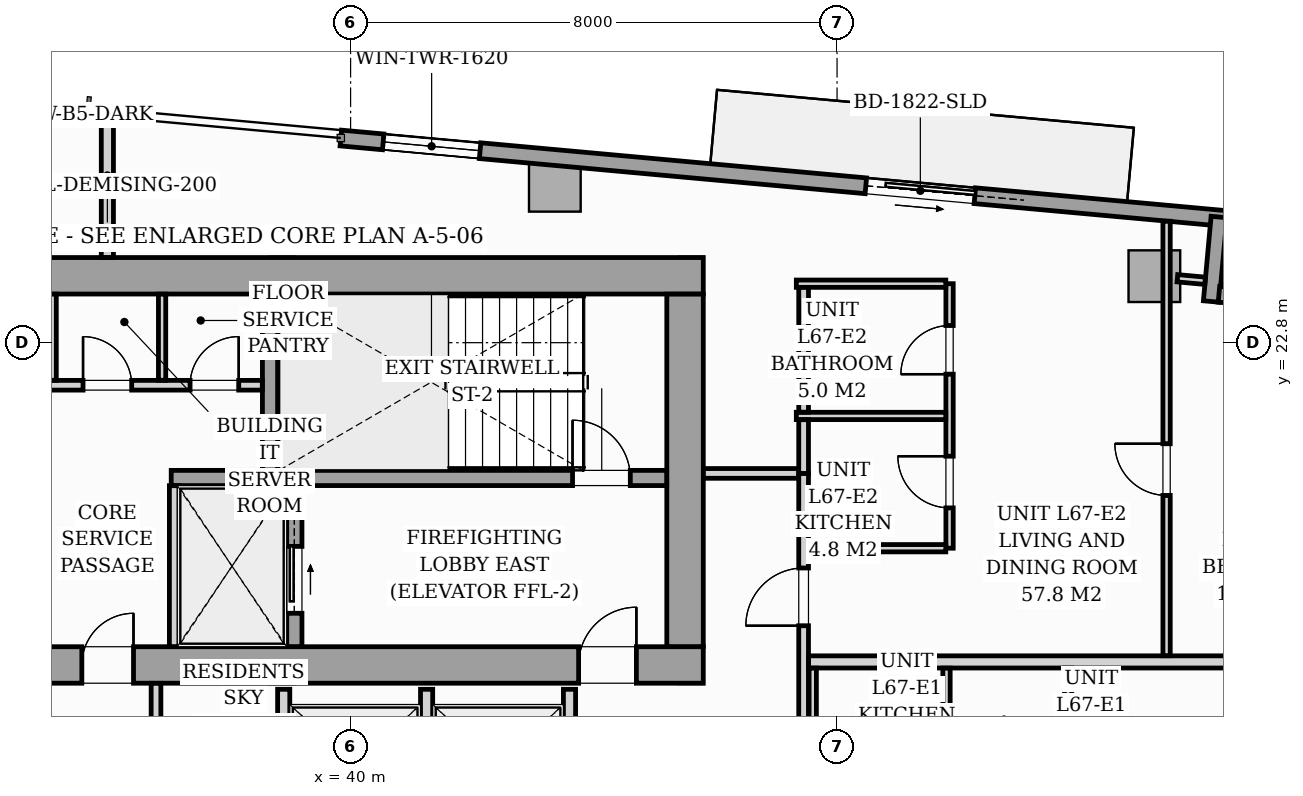
"""IFC4 building model, lengths in metres.
Left out: names, types, materials, properties, quantities, classifications, styles, units other than length and angle.
Written with IfcOpenShell. Run it as: python <this file> out.ifc"""

import sys

from ifc_helpers import new_model, si_unit, direction, frame, frame_2d, origin, origin_2d, place, context, subcontext, project, spatial, rectangle, i_section, extrude, source, transform, mapped, element, fill, save


model = new_model("IFC4")
c1 = context("Model", 3, precision=1e-05, world=origin(), true_north=direction((0.0, 1.0)))
c2 = subcontext(c1, "Body", "Model", "MODEL_VIEW")
j1 = project(units=[si_unit("LENGTHUNIT", "METRE"), si_unit("PLANEANGLEUNIT", "RADIAN")], contexts=[c1])
p1 = place(None, origin())
s1 = spatial("IfcSite", under=j1, at=p1, CompositionType="ELEMENT")
p2 = place(p1, origin())
s2 = spatial("IfcBuilding", under=s1, at=p2, CompositionType="ELEMENT")
p3 = place(p2, frame((0.0, 0.0, 233.1)))
s3 = spatial("IfcBuildingStorey", under=s2, at=p3, CompositionType="ELEMENT", Elevation=233.1)
m1 = source(origin(), c2, "Body", "SweptSolid", [
    extrude(i_section(OverallWidth=0.409, OverallDepth=0.425, WebThickness=0.033, FlangeThickness=0.052, FilletRadius=0.018, at=origin_2d()), origin(), (0.0, 0.0, 1.0), 3.296),
])
for number, where, z_axis, x_axis in (
    (1, (38.88, 17.4, 0.002), (0.0, 0.0, 1.0), (1.0, 0.0, 0.0)),
    (2, (45.6, 17.4, 0.002), (0.0, 0.0, 1.0), (1.0, 0.0, 0.0)),
    (3, (38.88, 24.0, 0.002), (0.0, 0.0, 1.0), (1.0, 0.0, 0.0)),
    (4, (45.6, 24.0, 0.002), (0.0, 0.0, 1.0), (1.0, 0.0, 0.0)),
):
    element("IfcColumn", number, at=place(p3, frame(where, z_axis=z_axis, x_axis=x_axis)), inside=s3, PredefinedType="PILASTER", context=c2, shape_type="MappedRepresentation", body=[
        mapped(m1, transform((0.0, 0.0, 0.0), scale=1.0)),
    ])
m2 = source(origin(), c2, "Body", "SweptSolid", [
    extrude(rectangle(XDim=0.85, YDim=0.85, at=origin_2d()), origin(), (0.0, 0.0, 1.0), 3.296),
])
for number, where, z_axis, x_axis in (
    (5, (43.359, 25.38, 0.002), (0.0, 0.0, 1.0), (0.996, -0.091, 0.0)),
    (6, (53.218, 23.894, 0.002), (0.0, 0.0, 1.0), (0.996, -0.091, 0.0)),
):
    element("IfcColumn", number, at=place(p3, frame(where, z_axis=z_axis, x_axis=x_axis)), inside=s3, PredefinedType="COLUMN", context=c2, shape_type="MappedRepresentation", body=[
        mapped(m2, transform((0.0, 0.0, 0.0), scale=1.0)),
    ])
p4 = place(p3, frame((39.839, 26.166, 0.0), z_axis=(0.0, 0.0, 1.0), x_axis=(0.995884447498, -0.090632043071, 0.0)))
e7 = element("IfcWall", 7, at=p4, inside=s3, PredefinedType="STANDARD", context=c2, shape_type="SweptSolid", body=[
    extrude(rectangle(XDim=14.63, YDim=0.26, at=frame_2d((7.315, 0.0))), origin(), (0.0, 0.0, 1.0), 3.04),
])
p5 = place(p4, frame((8.67, 0.0, 0.0)))
e8 = element("IfcOpeningElement", 8, at=p5, cuts=e7, PredefinedType="OPENING", context=c2, shape_type="SweptSolid", body=[
    extrude(rectangle(XDim=1.8, YDim=2.06, at=frame_2d((0.9, 1.03))), frame((0.0, 0.14, 0.0), z_axis=(0.0, -1.0, 0.0), x_axis=(1.0, 0.0, 0.0)), (0.0, 0.0, 1.0), 0.28),
])
p6 = place(p4, frame((0.7, 0.0, 0.65)))
e9 = element("IfcOpeningElement", 9, at=p6, cuts=e7, PredefinedType="OPENING", context=c2, shape_type="SweptSolid", body=[
    extrude(rectangle(XDim=1.6, YDim=1.5, at=frame_2d((0.8, 0.75))), frame((0.0, 0.14, 0.0), z_axis=(0.0, -1.0, 0.0), x_axis=(1.0, 0.0, 0.0)), (0.0, 0.0, 1.0), 0.28),
])
p7 = place(p3, frame((54.281, 24.866, 0.0), z_axis=(0.0, 0.0, 1.0), x_axis=(-0.090661991521, -0.995881721538, 0.0)))
e10 = element("IfcWall", 10, at=p7, inside=s3, PredefinedType="STANDARD", context=c2, shape_type="SweptSolid", body=[
    extrude(rectangle(XDim=1.395, YDim=0.26, at=frame_2d((0.698, 0.0))), origin(), (0.0, 0.0, 1.0), 3.04),
])
p8 = place(p3, frame((54.281, 23.596, 0.0), z_axis=(0.0, 0.0, 1.0), x_axis=(0.995883159782, -0.090646191665, 0.0)))
e11 = element("IfcWall", 11, at=p8, inside=s3, PredefinedType="STANDARD", context=c2, shape_type="SweptSolid", body=[
    extrude(rectangle(XDim=1.395, YDim=0.26, at=frame_2d((0.698, 0.0))), origin(), (0.0, 0.0, 1.0), 3.04),
])
p9 = place(p3, frame((26.2, 17.5, 0.0), z_axis=(0.0, 0.0, 1.0), x_axis=(1.0, 0.0, 0.0)))
e12 = element("IfcWall", 12, at=p9, inside=s3, PredefinedType="SHEAR", context=c2, shape_type="SweptSolid", body=[
    extrude(rectangle(XDim=19.6, YDim=0.6, at=frame_2d((9.8, 0.0))), origin(), (0.0, 0.0, 1.0), 3.3),
])
p10 = place(p9, frame((0.95, 0.0, 0.0)))
e13 = element("IfcOpeningElement", 13, at=p10, cuts=e12, PredefinedType="OPENING", context=c2, shape_type="SweptSolid", body=[
    extrude(rectangle(XDim=0.95, YDim=2.06, at=frame_2d((0.475, 1.03))), frame((0.0, 0.31, 0.0), z_axis=(0.0, -1.0, 0.0), x_axis=(1.0, 0.0, 0.0)), (0.0, 0.0, 1.0), 0.62),
])
p11 = place(p9, frame((9.38, 0.0, 0.0)))
e14 = element("IfcOpeningElement", 14, at=p11, cuts=e12, PredefinedType="OPENING", context=c2, shape_type="SweptSolid", body=[
    extrude(rectangle(XDim=0.85, YDim=2.0, at=frame_2d((0.425, 1.0))), frame((0.0, 0.31, 0.0), z_axis=(0.0, -1.0, 0.0), x_axis=(1.0, 0.0, 0.0)), (0.0, 0.0, 1.0), 0.62),
])
p12 = place(p9, frame((17.55, 0.0, 0.0)))
e15 = element("IfcOpeningElement", 15, at=p12, cuts=e12, PredefinedType="OPENING", context=c2, shape_type="SweptSolid", body=[
    extrude(rectangle(XDim=0.95, YDim=2.06, at=frame_2d((0.475, 1.03))), frame((0.0, 0.31, 0.0), z_axis=(0.0, -1.0, 0.0), x_axis=(1.0, 0.0, 0.0)), (0.0, 0.0, 1.0), 0.62),
])
p13 = place(p3, frame((26.2, 23.9, 0.0), z_axis=(0.0, 0.0, 1.0), x_axis=(1.0, 0.0, 0.0)))
e16 = element("IfcWall", 16, at=p13, inside=s3, PredefinedType="SHEAR", context=c2, shape_type="SweptSolid", body=[
    extrude(rectangle(XDim=19.6, YDim=0.6, at=frame_2d((9.8, 0.0))), origin(), (0.0, 0.0, 1.0), 3.3),
])
p14 = place(p3, frame((45.5, 17.802, 0.0), z_axis=(0.0, 0.0, 1.0), x_axis=(0.0, 1.0, 0.0)))
e17 = element("IfcWall", 17, at=p14, inside=s3, PredefinedType="SHEAR", context=c2, shape_type="SweptSolid", body=[
    extrude(rectangle(XDim=5.796, YDim=0.6, at=frame_2d((2.898, 0.0))), origin(), (0.0, 0.0, 1.0), 3.3),
])
p15 = place(p3, frame((37.05, 20.575, 0.0), z_axis=(0.0, 0.0, 1.0), x_axis=(1.0, 0.0, 0.0)))
e18 = element("IfcWall", 18, at=p15, inside=s3, PredefinedType="SOLIDWALL", context=c2, shape_type="SweptSolid", body=[
    extrude(rectangle(XDim=8.148, YDim=0.25, at=frame_2d((4.074, 0.0))), origin(), (0.0, 0.0, 1.0), 3.3),
])
p16 = place(p15, frame((6.6, 0.0, 0.0)))
e19 = element("IfcOpeningElement", 19, at=p16, cuts=e18, PredefinedType="OPENING", context=c2, shape_type="SweptSolid", body=[
    extrude(rectangle(XDim=0.95, YDim=2.06, at=frame_2d((0.475, 1.03))), frame((0.0, 0.135, 0.0), z_axis=(0.0, -1.0, 0.0), x_axis=(1.0, 0.0, 0.0)), (0.0, 0.0, 1.0), 0.27),
])
p17 = place(p3, frame((38.675, 20.702, 0.0), z_axis=(0.0, 0.0, 1.0), x_axis=(0.0, 1.0, 0.0)))
e20 = element("IfcWall", 20, at=p17, inside=s3, PredefinedType="SOLIDWALL", context=c2, shape_type="SweptSolid", body=[
    extrude(rectangle(XDim=2.896, YDim=0.25, at=frame_2d((1.448, 0.0))), origin(), (0.0, 0.0, 1.0), 3.3),
])
p18 = place(p3, frame((37.1, 17.802, 0.0), z_axis=(0.0, 0.0, 1.0), x_axis=(0.0, 1.0, 0.0)))
e21 = element("IfcWall", 21, at=p18, inside=s3, PredefinedType="PARTITIONING", context=c2, shape_type="SweptSolid", body=[
    extrude(rectangle(XDim=2.646, YDim=0.16, at=frame_2d((1.323, 0.0))), origin(), (0.0, 0.0, 1.0), 3.04),
])
p19 = place(p3, frame((39.075, 17.802, 0.0), z_axis=(0.0, 0.0, 1.0), x_axis=(0.0, 1.0, 0.0)))
e22 = element("IfcWall", 22, at=p19, inside=s3, PredefinedType="SOLIDWALL", context=c2, shape_type="SweptSolid", body=[
    extrude(rectangle(XDim=2.646, YDim=0.25, at=frame_2d((1.323, 0.0))), origin(), (0.0, 0.0, 1.0), 3.3),
])
p20 = place(p19, frame((0.548, 0.0, 0.0)))
e23 = element("IfcOpeningElement", 23, at=p20, cuts=e22, PredefinedType="OPENING", context=c2, shape_type="SweptSolid", body=[
    extrude(rectangle(XDim=1.1, YDim=2.08, at=frame_2d((0.55, 1.04))), frame((0.0, 0.135, 0.0), z_axis=(0.0, -1.0, 0.0), x_axis=(1.0, 0.0, 0.0)), (0.0, 0.0, 1.0), 0.27),
])
p21 = place(p3, frame((33.452, 22.1, 0.0), z_axis=(0.0, 0.0, 1.0), x_axis=(1.0, 0.0, 0.0)))
e24 = element("IfcWall", 24, at=p21, inside=s3, PredefinedType="PARTITIONING", context=c2, shape_type="SweptSolid", body=[
    extrude(rectangle(XDim=5.096, YDim=0.16, at=frame_2d((2.548, 0.0))), origin(), (0.0, 0.0, 1.0), 3.04),
])
p22 = place(p21, frame((0.388, 0.0, 0.0)))
e25 = element("IfcOpeningElement", 25, at=p22, cuts=e24, PredefinedType="OPENING", context=c2, shape_type="SweptSolid", body=[
    extrude(rectangle(XDim=0.8, YDim=2.05, at=frame_2d((0.4, 1.025))), frame((0.0, 0.09, 0.0), z_axis=(0.0, -1.0, 0.0), x_axis=(1.0, 0.0, 0.0)), (0.0, 0.0, 1.0), 0.18),
])
p23 = place(p21, frame((2.148, 0.0, 0.0)))
e26 = element("IfcOpeningElement", 26, at=p23, cuts=e24, PredefinedType="OPENING", context=c2, shape_type="SweptSolid", body=[
    extrude(rectangle(XDim=0.8, YDim=2.05, at=frame_2d((0.4, 1.025))), frame((0.0, 0.09, 0.0), z_axis=(0.0, -1.0, 0.0), x_axis=(1.0, 0.0, 0.0)), (0.0, 0.0, 1.0), 0.18),
])
p24 = place(p21, frame((3.908, 0.0, 0.0)))
e27 = element("IfcOpeningElement", 27, at=p24, cuts=e24, PredefinedType="OPENING", context=c2, shape_type="SweptSolid", body=[
    extrude(rectangle(XDim=0.8, YDim=2.05, at=frame_2d((0.4, 1.025))), frame((0.0, 0.09, 0.0), z_axis=(0.0, -1.0, 0.0), x_axis=(1.0, 0.0, 0.0)), (0.0, 0.0, 1.0), 0.18),
])
for number, where, z_axis, x_axis in (
    (28, (35.1, 22.182, 0.0), (0.0, 0.0, 1.0), (0.0, 1.0, 0.0)),
    (29, (36.9, 22.182, 0.0), (0.0, 0.0, 1.0), (0.0, 1.0, 0.0)),
):
    element("IfcWall", number, at=place(p3, frame(where, z_axis=z_axis, x_axis=x_axis)), inside=s3, PredefinedType="PARTITIONING", context=c2, shape_type="SweptSolid", body=[
        extrude(rectangle(XDim=1.416, YDim=0.12, at=frame_2d((0.708, 0.0))), origin(), (0.0, 0.0, 1.0), 3.04),
    ])
for number, where, z_axis, x_axis in (
    (30, (38.9, 14.75, 0.0), (0.0, 0.0, 1.0), (0.0, 1.0, 0.0)),
    (31, (41.25, 14.75, 0.0), (0.0, 0.0, 1.0), (0.0, 1.0, 0.0)),
    (32, (43.6, 14.75, 0.0), (0.0, 0.0, 1.0), (0.0, 1.0, 0.0)),
):
    element("IfcWall", number, at=place(p3, frame(where, z_axis=z_axis, x_axis=x_axis)), inside=s3, PredefinedType="PARTITIONING", context=c2, shape_type="SweptSolid", body=[
        extrude(rectangle(XDim=2.35, YDim=0.2, at=frame_2d((1.175, 0.0))), origin(), (0.0, 0.0, 1.0), 3.04),
    ])
p25 = place(p3, frame((47.45, 13.362, 0.0), z_axis=(0.0, 0.0, 1.0), x_axis=(0.0, 1.0, 0.0)))
e33 = element("IfcWall", 33, at=p25, inside=s3, PredefinedType="PARTITIONING", context=c2, shape_type="SweptSolid", body=[
    extrude(rectangle(XDim=7.288, YDim=0.16, at=frame_2d((3.644, 0.0))), origin(), (0.0, 0.0, 1.0), 3.04),
])
p26 = place(p25, frame((0.493, 0.0, 0.0)))
e34 = element("IfcOpeningElement", 34, at=p26, cuts=e33, PredefinedType="OPENING", context=c2, shape_type="SweptSolid", body=[
    extrude(rectangle(XDim=0.95, YDim=2.06, at=frame_2d((0.475, 1.03))), frame((0.0, 0.09, 0.0), z_axis=(0.0, -1.0, 0.0), x_axis=(1.0, 0.0, 0.0)), (0.0, 0.0, 1.0), 0.18),
])
p27 = place(p25, frame((4.783, 0.0, 0.0)))
e35 = element("IfcOpeningElement", 35, at=p27, cuts=e33, PredefinedType="OPENING", context=c2, shape_type="SweptSolid", body=[
    extrude(rectangle(XDim=0.95, YDim=2.06, at=frame_2d((0.475, 1.03))), frame((0.0, 0.09, 0.0), z_axis=(0.0, -1.0, 0.0), x_axis=(1.0, 0.0, 0.0)), (0.0, 0.0, 1.0), 0.18),
])
p28 = place(p3, frame((36.0, 24.202, 0.0), z_axis=(0.0, 0.0, 1.0), x_axis=(0.0, 1.0, 0.0)))
e36 = element("IfcWall", 36, at=p28, inside=s3, PredefinedType="PARTITIONING", context=c2, shape_type="SweptSolid", body=[
    extrude(rectangle(XDim=2.363, YDim=0.2, at=frame_2d((1.182, 0.0))), origin(), (0.0, 0.0, 1.0), 3.04),
])
p29 = place(p3, frame((45.802, 20.65, 0.0), z_axis=(0.0, 0.0, 1.0), x_axis=(1.0, 0.0, 0.0)))
e37 = element("IfcWall", 37, at=p29, inside=s3, PredefinedType="PARTITIONING", context=c2, shape_type="SweptSolid", body=[
    extrude(rectangle(XDim=1.566, YDim=0.16, at=frame_2d((0.783, 0.0))), origin(), (0.0, 0.0, 1.0), 3.04),
])
p30 = place(p3, frame((47.532, 17.55, 0.0), z_axis=(0.0, 0.0, 1.0), x_axis=(1.0, 0.0, 0.0)))
e38 = element("IfcWall", 38, at=p30, inside=s3, PredefinedType="PARTITIONING", context=c2, shape_type="SweptSolid", body=[
    extrude(rectangle(XDim=8.643, YDim=0.2, at=frame_2d((4.322, 0.0))), origin(), (0.0, 0.0, 1.0), 3.04),
])
for number, where, z_axis, x_axis in (
    (39, (47.6, 15.262, 0.0), (0.0, 0.0, 1.0), (0.0, 1.0, 0.0)),
    (40, (49.8, 15.262, 0.0), (0.0, 0.0, 1.0), (0.0, 1.0, 0.0)),
    (41, (51.8, 15.262, 0.0), (0.0, 0.0, 1.0), (0.0, 1.0, 0.0)),
):
    element("IfcWall", number, at=place(p3, frame(where, z_axis=z_axis, x_axis=x_axis)), inside=s3, PredefinedType="PARTITIONING", context=c2, shape_type="SweptSolid", body=[
        extrude(rectangle(XDim=2.186, YDim=0.12, at=frame_2d((1.093, 0.0))), origin(), (0.0, 0.0, 1.0), 3.04),
    ])
p31 = place(p3, frame((49.85, 19.42, 0.0), z_axis=(0.0, 0.0, 1.0), x_axis=(0.0, 1.0, 0.0)))
e42 = element("IfcWall", 42, at=p31, inside=s3, PredefinedType="PARTITIONING", context=c2, shape_type="SweptSolid", body=[
    extrude(rectangle(XDim=4.35, YDim=0.12, at=frame_2d((2.175, 0.0))), origin(), (0.0, 0.0, 1.0), 3.04),
])
p32 = place(p31, frame((0.663, 0.0, 0.0)))
e43 = element("IfcOpeningElement", 43, at=p32, cuts=e42, PredefinedType="OPENING", context=c2, shape_type="SweptSolid", body=[
    extrude(rectangle(XDim=0.85, YDim=2.05, at=frame_2d((0.425, 1.025))), frame((0.0, 0.07, 0.0), z_axis=(0.0, -1.0, 0.0), x_axis=(1.0, 0.0, 0.0)), (0.0, 0.0, 1.0), 0.14),
])
p33 = place(p31, frame((2.862, 0.0, 0.0)))
e44 = element("IfcOpeningElement", 44, at=p33, cuts=e42, PredefinedType="OPENING", context=c2, shape_type="SweptSolid", body=[
    extrude(rectangle(XDim=0.8, YDim=2.02, at=frame_2d((0.4, 1.01))), frame((0.0, 0.07, 0.0), z_axis=(0.0, -1.0, 0.0), x_axis=(1.0, 0.0, 0.0)), (0.0, 0.0, 1.0), 0.14),
])
p34 = place(p3, frame((47.33, 21.595, 0.0), z_axis=(0.0, 0.0, 1.0), x_axis=(1.0, 0.0, 0.0)))
e45 = element("IfcWall", 45, at=p34, inside=s3, PredefinedType="PARTITIONING", context=c2, shape_type="SweptSolid", body=[
    extrude(rectangle(XDim=2.458, YDim=0.12, at=frame_2d((1.229, 0.0))), origin(), (0.0, 0.0, 1.0), 3.04),
])
p35 = place(p3, frame((47.532, 19.42, 0.0), z_axis=(0.0, 0.0, 1.0), x_axis=(1.0, 0.0, 0.0)))
e46 = element("IfcWall", 46, at=p35, inside=s3, PredefinedType="PARTITIONING", context=c2, shape_type="SweptSolid", body=[
    extrude(rectangle(XDim=2.256, YDim=0.12, at=frame_2d((1.128, 0.0))), origin(), (0.0, 0.0, 1.0), 3.04),
])
p36 = place(p3, frame((47.33, 23.77, 0.0), z_axis=(0.0, 0.0, 1.0), x_axis=(1.0, 0.0, 0.0)))
e47 = element("IfcWall", 47, at=p36, inside=s3, PredefinedType="PARTITIONING", context=c2, shape_type="SweptSolid", body=[
    extrude(rectangle(XDim=2.458, YDim=0.12, at=frame_2d((1.229, 0.0))), origin(), (0.0, 0.0, 1.0), 3.04),
])
p37 = place(p3, frame((47.45, 20.65, 0.0), z_axis=(0.0, 0.0, 1.0), x_axis=(0.0, 1.0, 0.0)))
e48 = element("IfcWall", 48, at=p37, inside=s3, PredefinedType="PARTITIONING", context=c2, shape_type="SweptSolid", body=[
    extrude(rectangle(XDim=0.883, YDim=0.16, at=frame_2d((0.441, 0.0))), origin(), (0.0, 0.0, 1.0), 3.04),
])
p38 = place(p3, frame((47.45, 21.657, 0.0), z_axis=(0.0, 0.0, 1.0), x_axis=(0.0, 1.0, 0.0)))
e49 = element("IfcWall", 49, at=p38, inside=s3, PredefinedType="PARTITIONING", context=c2, shape_type="SweptSolid", body=[
    extrude(rectangle(XDim=2.051, YDim=0.16, at=frame_2d((1.025, 0.0))), origin(), (0.0, 0.0, 1.0), 3.04),
])
p39 = place(p3, frame((53.419, 17.652, 0.0), z_axis=(0.0, 0.0, 1.0), x_axis=(0.0, 1.0, 0.0)))
e50 = element("IfcWall", 50, at=p39, inside=s3, PredefinedType="PARTITIONING", context=c2, shape_type="SweptSolid", body=[
    extrude(rectangle(XDim=7.145, YDim=0.12, at=frame_2d((3.573, 0.0))), origin(), (0.0, 0.0, 1.0), 2.482),
])
p40 = place(p39, frame((2.636, 0.0, 0.0)))
e51 = element("IfcOpeningElement", 51, at=p40, cuts=e50, PredefinedType="OPENING", context=c2, shape_type="SweptSolid", body=[
    extrude(rectangle(XDim=0.85, YDim=2.05, at=frame_2d((0.425, 1.025))), frame((0.0, 0.07, 0.0), z_axis=(0.0, -1.0, 0.0), x_axis=(1.0, 0.0, 0.0)), (0.0, 0.0, 1.0), 0.14),
])
p41 = place(p3, frame((36.8, 14.7, 0.0), z_axis=(0.0, 0.0, 1.0), x_axis=(0.0, 1.0, 0.0)))
e52 = element("IfcWall", 52, at=p41, inside=s3, PredefinedType="PARTITIONING", context=c2, shape_type="SweptSolid", body=[
    extrude(rectangle(XDim=2.498, YDim=0.16, at=frame_2d((1.249, 0.0))), origin(), (0.0, 0.0, 1.0), 3.04),
])
p42 = place(p3, frame((53.597, 23.859, 0.0), z_axis=(0.0, 0.0, 1.0), x_axis=(0.995884462012, -0.090631883588, 0.0)))
e53 = element("IfcWall", 53, at=p42, inside=s3, PredefinedType="PARTITIONING", context=c2, shape_type="SweptSolid", body=[
    extrude(rectangle(XDim=0.458, YDim=0.12, at=frame_2d((0.229, 0.0))), origin(), (0.0, 0.0, 1.0), 3.04),
])
m3 = source(origin(), c2, "Body", "SweptSolid", [
    extrude(rectangle(XDim=1.8, YDim=2.06, at=frame_2d((0.9, 1.03))), frame((0.0, 0.025, 0.0), z_axis=(0.0, -1.0, 0.0), x_axis=(1.0, 0.0, 0.0)), (0.0, 0.0, 1.0), 0.05),
])
p43 = place(p5, origin())
e54 = element("IfcDoor", 54, at=p43, inside=s3, OperationType="SLIDING_TO_RIGHT", PredefinedType="DOOR", context=c2, shape_type="MappedRepresentation", body=[
    mapped(m3, transform((0.0, 0.0, 0.0), scale=1.0)),
])
fill(e8, e54)
m4 = source(origin(), c2, "Body", "SweptSolid", [
    extrude(rectangle(XDim=1.6, YDim=1.5, at=frame_2d((0.8, 0.75))), frame((0.0, 0.03, 0.0), z_axis=(0.0, -1.0, 0.0), x_axis=(1.0, 0.0, 0.0)), (0.0, 0.0, 1.0), 0.06),
])
p44 = place(p6, origin())
e55 = element("IfcWindow", 55, at=p44, inside=s3, PartitioningType="SINGLE_PANEL", PredefinedType="WINDOW", context=c2, shape_type="MappedRepresentation", body=[
    mapped(m4, transform((0.0, 0.0, 0.0), scale=1.0)),
])
fill(e9, e55)
m5 = source(origin(), c2, "Body", "SweptSolid", [
    extrude(rectangle(XDim=0.85, YDim=2.0, at=frame_2d((0.425, 1.0))), frame((0.0, 0.025, 0.0), z_axis=(0.0, -1.0, 0.0), x_axis=(1.0, 0.0, 0.0)), (0.0, 0.0, 1.0), 0.05),
])
p45 = place(p11, origin())
e56 = element("IfcDoor", 56, at=p45, inside=s3, OperationType="SINGLE_SWING_RIGHT", PredefinedType="DOOR", context=c2, shape_type="MappedRepresentation", body=[
    mapped(m5, transform((0.0, 0.0, 0.0), scale=1.0)),
])
fill(e14, e56)
m6 = source(origin(), c2, "Body", "SweptSolid", [
    extrude(rectangle(XDim=0.95, YDim=2.06, at=frame_2d((0.475, 1.03))), frame((0.0, 0.025, 0.0), z_axis=(0.0, -1.0, 0.0), x_axis=(1.0, 0.0, 0.0)), (0.0, 0.0, 1.0), 0.05),
])
p46 = place(p12, origin())
e57 = element("IfcDoor", 57, at=p46, inside=s3, OperationType="SINGLE_SWING_RIGHT", PredefinedType="DOOR", context=c2, shape_type="MappedRepresentation", body=[
    mapped(m6, transform((0.0, 0.0, 0.0), scale=1.0)),
])
fill(e15, e57)
p47 = place(p16, origin())
e58 = element("IfcDoor", 58, at=p47, inside=s3, OperationType="SINGLE_SWING_LEFT", PredefinedType="DOOR", context=c2, shape_type="MappedRepresentation", body=[
    mapped(m6, transform((0.0, 0.0, 0.0), scale=1.0)),
])
fill(e19, e58)
m7 = source(origin(), c2, "Body", "SweptSolid", [
    extrude(rectangle(XDim=1.1, YDim=2.08, at=frame_2d((0.55, 1.04))), frame((0.0, 0.025, 0.0), z_axis=(0.0, -1.0, 0.0), x_axis=(1.0, 0.0, 0.0)), (0.0, 0.0, 1.0), 0.05),
])
p48 = place(p20, origin())
e59 = element("IfcDoor", 59, at=p48, inside=s3, OperationType="SLIDING_TO_RIGHT", PredefinedType="DOOR", context=c2, shape_type="MappedRepresentation", body=[
    mapped(m7, transform((0.0, 0.0, 0.0), scale=1.0)),
])
fill(e23, e59)
m8 = source(origin(), c2, "Body", "SweptSolid", [
    extrude(rectangle(XDim=0.8, YDim=2.05, at=frame_2d((0.4, 1.025))), frame((0.0, 0.025, 0.0), z_axis=(0.0, -1.0, 0.0), x_axis=(1.0, 0.0, 0.0)), (0.0, 0.0, 1.0), 0.05),
])
p49 = place(p23, origin())
e60 = element("IfcDoor", 60, at=p49, inside=s3, OperationType="SINGLE_SWING_LEFT", PredefinedType="DOOR", context=c2, shape_type="MappedRepresentation", body=[
    mapped(m8, transform((0.0, 0.0, 0.0), scale=1.0)),
])
fill(e26, e60)
p50 = place(p24, origin())
e61 = element("IfcDoor", 61, at=p50, inside=s3, OperationType="SINGLE_SWING_RIGHT", PredefinedType="DOOR", context=c2, shape_type="MappedRepresentation", body=[
    mapped(m8, transform((0.0, 0.0, 0.0), scale=1.0)),
])
fill(e27, e61)
m9 = source(origin(), c2, "Body", "SweptSolid", [
    extrude(rectangle(XDim=0.95, YDim=2.06, at=frame_2d((0.475, 1.03))), frame((0.0, 0.025, 0.0), z_axis=(0.0, -1.0, 0.0), x_axis=(1.0, 0.0, 0.0)), (0.0, 0.0, 1.0), 0.05),
])
p51 = place(p27, origin())
e62 = element("IfcDoor", 62, at=p51, inside=s3, OperationType="SINGLE_SWING_LEFT", PredefinedType="DOOR", context=c2, shape_type="MappedRepresentation", body=[
    mapped(m9, transform((0.0, 0.0, 0.0), scale=1.0)),
])
fill(e35, e62)
m10 = source(origin(), c2, "Body", "SweptSolid", [
    extrude(rectangle(XDim=0.85, YDim=2.05, at=frame_2d((0.425, 1.025))), frame((0.0, 0.025, 0.0), z_axis=(0.0, -1.0, 0.0), x_axis=(1.0, 0.0, 0.0)), (0.0, 0.0, 1.0), 0.05),
])
p52 = place(p32, origin())
e63 = element("IfcDoor", 63, at=p52, inside=s3, OperationType="SINGLE_SWING_RIGHT", PredefinedType="DOOR", context=c2, shape_type="MappedRepresentation", body=[
    mapped(m10, transform((0.0, 0.0, 0.0), scale=1.0)),
])
fill(e43, e63)
m11 = source(origin(), c2, "Body", "SweptSolid", [
    extrude(rectangle(XDim=0.8, YDim=2.02, at=frame_2d((0.4, 1.01))), frame((0.0, 0.025, 0.0), z_axis=(0.0, -1.0, 0.0), x_axis=(1.0, 0.0, 0.0)), (0.0, 0.0, 1.0), 0.05),
])
p53 = place(p33, origin())
e64 = element("IfcDoor", 64, at=p53, inside=s3, OperationType="SINGLE_SWING_LEFT", PredefinedType="DOOR", context=c2, shape_type="MappedRepresentation", body=[
    mapped(m11, transform((0.0, 0.0, 0.0), scale=1.0)),
])
fill(e44, e64)
p54 = place(p40, origin())
e65 = element("IfcDoor", 65, at=p54, inside=s3, OperationType="SINGLE_SWING_RIGHT", PredefinedType="DOOR", context=c2, shape_type="MappedRepresentation", body=[
    mapped(m10, transform((0.0, 0.0, 0.0), scale=1.0)),
])
fill(e51, e65)
save(model, sys.argv[1])
